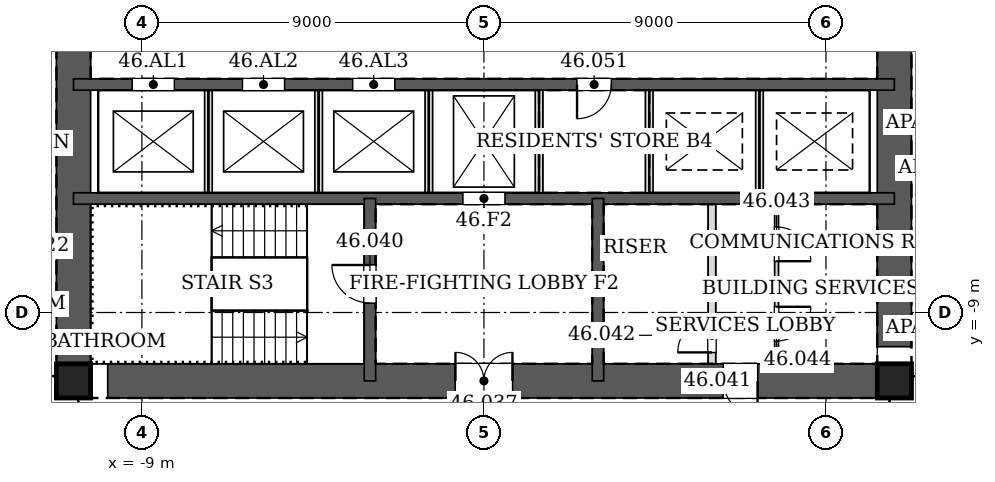
"""IFC4 building model, lengths in metres.
Left out: names, types, materials, properties, quantities, classifications, styles, units other than length and angle.
Written with IfcOpenShell. Run it as: python <this file> out.ifc"""

import sys

from ifc_helpers import new_model, si_unit, direction, frame, frame_2d, origin, origin_2d, place, context, subcontext, project, spatial, rectangle, hollow_rectangle, extrude, element, fill, save


model = new_model("IFC4")
c1 = context("Model", 3, precision=1e-05, world=origin(), true_north=direction((0.0, 1.0)))
c2 = subcontext(c1, "Body", "Model", "MODEL_VIEW")
j1 = project(units=[si_unit("LENGTHUNIT", "METRE"), si_unit("PLANEANGLEUNIT", "RADIAN")], contexts=[c1])
p1 = place(None, origin())
s1 = spatial("IfcSite", under=j1, at=p1, CompositionType="ELEMENT")
p2 = place(p1, origin())
s2 = spatial("IfcBuilding", under=s1, at=p2, CompositionType="ELEMENT")
p3 = place(p2, frame((0.0, 0.0, 204.0)))
s3 = spatial("IfcBuildingStorey", under=s2, at=p3, CompositionType="ELEMENT", Elevation=204.0)
for number, where, z_axis, x_axis in (
    (1, (-10.8, -10.8, 0.0), (0.0, 0.0, 1.0), (1.0, 0.0, 0.0)),
    (2, (10.8, -10.8, 0.0), (0.0, 0.0, 1.0), (1.0, 0.0, 0.0)),
):
    element("IfcColumn", number, at=place(p3, frame(where, z_axis=z_axis, x_axis=x_axis)), inside=s3, PredefinedType="COLUMN", context=c2, shape_type="SweptSolid", body=[
        extrude(hollow_rectangle(XDim=0.9, YDim=0.9, WallThickness=0.05, at=origin_2d()), origin(), (0.0, 0.0, 1.0), 3.4),
    ])
p4 = place(p3, frame((-10.8, -10.8, 0.0), z_axis=(0.0, 0.0, 1.0), x_axis=(1.0, 0.0, 0.0)))
e3 = element("IfcWall", 3, at=p4, inside=s3, PredefinedType="SOLIDWALL", context=c2, shape_type="SweptSolid", body=[
    extrude(rectangle(XDim=21.6, YDim=0.9, at=frame_2d((10.8, 0.0))), origin(), (0.0, 0.0, 1.0), 3.4),
])
p5 = place(p4, frame((10.05, 0.0, 0.0)))
e4 = element("IfcOpeningElement", 4, at=p5, cuts=e3, PredefinedType="OPENING", context=c2, shape_type="SweptSolid", body=[
    extrude(rectangle(XDim=1.5, YDim=2.1, at=frame_2d((0.75, 1.05))), frame((0.0, 0.46, 0.0), z_axis=(0.0, -1.0, 0.0), x_axis=(1.0, 0.0, 0.0)), (0.0, 0.0, 1.0), 0.92),
])
p6 = place(p4, frame((17.1, 0.0, 0.0)))
e5 = element("IfcOpeningElement", 5, at=p6, cuts=e3, PredefinedType="OPENING", context=c2, shape_type="SweptSolid", body=[
    extrude(rectangle(XDim=0.9, YDim=2.1, at=frame_2d((0.45, 1.05))), frame((0.0, 0.46, 0.0), z_axis=(0.0, -1.0, 0.0), x_axis=(1.0, 0.0, 0.0)), (0.0, 0.0, 1.0), 0.92),
])
p7 = place(p3, frame((10.8, -10.8, 0.0), z_axis=(0.0, 0.0, 1.0), x_axis=(0.0, 1.0, 0.0)))
e6 = element("IfcWall", 6, at=p7, inside=s3, PredefinedType="SOLIDWALL", context=c2, shape_type="SweptSolid", body=[
    extrude(rectangle(XDim=21.6, YDim=0.9, at=frame_2d((10.8, 0.0))), origin(), (0.0, 0.0, 1.0), 3.4),
])
p8 = place(p7, frame((11.7, 0.0, 0.0)))
e7 = element("IfcOpeningElement", 7, at=p8, cuts=e6, PredefinedType="OPENING", context=c2, shape_type="SweptSolid", body=[
    extrude(rectangle(XDim=1.2, YDim=2.1, at=frame_2d((0.6, 1.05))), frame((0.0, 0.46, 0.0), z_axis=(0.0, -1.0, 0.0), x_axis=(1.0, 0.0, 0.0)), (0.0, 0.0, 1.0), 0.92),
])
p9 = place(p7, frame((8.7, 0.0, 0.0)))
e8 = element("IfcOpeningElement", 8, at=p9, cuts=e6, PredefinedType="OPENING", context=c2, shape_type="SweptSolid", body=[
    extrude(rectangle(XDim=1.2, YDim=2.1, at=frame_2d((0.6, 1.05))), frame((0.0, 0.46, 0.0), z_axis=(0.0, -1.0, 0.0), x_axis=(1.0, 0.0, 0.0)), (0.0, 0.0, 1.0), 0.92),
])
p10 = place(p3, frame((-10.8, 10.8, 0.0), z_axis=(0.0, 0.0, 1.0), x_axis=(0.0, -1.0, 0.0)))
e9 = element("IfcWall", 9, at=p10, inside=s3, PredefinedType="SOLIDWALL", context=c2, shape_type="SweptSolid", body=[
    extrude(rectangle(XDim=21.6, YDim=0.9, at=frame_2d((10.8, 0.0))), origin(), (0.0, 0.0, 1.0), 3.4),
])
p11 = place(p10, frame((8.7, 0.0, 0.0)))
e10 = element("IfcOpeningElement", 10, at=p11, cuts=e9, PredefinedType="OPENING", context=c2, shape_type="SweptSolid", body=[
    extrude(rectangle(XDim=1.2, YDim=2.1, at=frame_2d((0.6, 1.05))), frame((0.0, 0.46, 0.0), z_axis=(0.0, -1.0, 0.0), x_axis=(1.0, 0.0, 0.0)), (0.0, 0.0, 1.0), 0.92),
])
p12 = place(p10, frame((11.7, 0.0, 0.0)))
e11 = element("IfcOpeningElement", 11, at=p12, cuts=e9, PredefinedType="OPENING", context=c2, shape_type="SweptSolid", body=[
    extrude(rectangle(XDim=1.2, YDim=2.1, at=frame_2d((0.6, 1.05))), frame((0.0, 0.46, 0.0), z_axis=(0.0, -1.0, 0.0), x_axis=(1.0, 0.0, 0.0)), (0.0, 0.0, 1.0), 0.92),
])
p13 = place(p3, frame((-10.8, -3.0, 0.0), z_axis=(0.0, 0.0, 1.0), x_axis=(1.0, 0.0, 0.0)))
e12 = element("IfcWall", 12, at=p13, inside=s3, PredefinedType="SOLIDWALL", context=c2, shape_type="SweptSolid", body=[
    extrude(rectangle(XDim=21.6, YDim=0.3, at=frame_2d((10.8, 0.0))), origin(), (0.0, 0.0, 1.0), 3.4),
])
p14 = place(p13, frame((13.25, 0.0, 0.0)))
e13 = element("IfcOpeningElement", 13, at=p14, cuts=e12, PredefinedType="OPENING", context=c2, shape_type="SweptSolid", body=[
    extrude(rectangle(XDim=0.9, YDim=2.1, at=frame_2d((0.45, 1.05))), frame((0.0, 0.16, 0.0), z_axis=(0.0, -1.0, 0.0), x_axis=(1.0, 0.0, 0.0)), (0.0, 0.0, 1.0), 0.32),
])
p15 = place(p13, frame((1.55, 0.0, 0.0)))
e14 = element("IfcOpeningElement", 14, at=p15, cuts=e12, PredefinedType="OPENING", context=c2, shape_type="SweptSolid", body=[
    extrude(rectangle(XDim=1.1, YDim=2.1, at=frame_2d((0.55, 1.05))), frame((0.0, 0.16, 0.0), z_axis=(0.0, -1.0, 0.0), x_axis=(1.0, 0.0, 0.0)), (0.0, 0.0, 1.0), 0.32),
])
p16 = place(p13, frame((4.45, 0.0, 0.0)))
e15 = element("IfcOpeningElement", 15, at=p16, cuts=e12, PredefinedType="OPENING", context=c2, shape_type="SweptSolid", body=[
    extrude(rectangle(XDim=1.1, YDim=2.1, at=frame_2d((0.55, 1.05))), frame((0.0, 0.16, 0.0), z_axis=(0.0, -1.0, 0.0), x_axis=(1.0, 0.0, 0.0)), (0.0, 0.0, 1.0), 0.32),
])
p17 = place(p13, frame((7.35, 0.0, 0.0)))
e16 = element("IfcOpeningElement", 16, at=p17, cuts=e12, PredefinedType="OPENING", context=c2, shape_type="SweptSolid", body=[
    extrude(rectangle(XDim=1.1, YDim=2.1, at=frame_2d((0.55, 1.05))), frame((0.0, 0.16, 0.0), z_axis=(0.0, -1.0, 0.0), x_axis=(1.0, 0.0, 0.0)), (0.0, 0.0, 1.0), 0.32),
])
p18 = place(p3, frame((-10.8, -6.0, 0.0), z_axis=(0.0, 0.0, 1.0), x_axis=(1.0, 0.0, 0.0)))
e17 = element("IfcWall", 17, at=p18, inside=s3, PredefinedType="SOLIDWALL", context=c2, shape_type="SweptSolid", body=[
    extrude(rectangle(XDim=21.6, YDim=0.3, at=frame_2d((10.8, 0.0))), origin(), (0.0, 0.0, 1.0), 3.4),
])
p19 = place(p18, frame((10.25, 0.0, 0.0)))
e18 = element("IfcOpeningElement", 18, at=p19, cuts=e17, PredefinedType="OPENING", context=c2, shape_type="SweptSolid", body=[
    extrude(rectangle(XDim=1.1, YDim=2.1, at=frame_2d((0.55, 1.05))), frame((0.0, 0.16, 0.0), z_axis=(0.0, -1.0, 0.0), x_axis=(1.0, 0.0, 0.0)), (0.0, 0.0, 1.0), 0.32),
])
p20 = place(p3, frame((-3.0, -6.0, 0.0), z_axis=(0.0, 0.0, 1.0), x_axis=(0.0, -1.0, 0.0)))
e19 = element("IfcWall", 19, at=p20, inside=s3, PredefinedType="SOLIDWALL", context=c2, shape_type="SweptSolid", body=[
    extrude(rectangle(XDim=4.8, YDim=0.3, at=frame_2d((2.4, 0.0))), origin(), (0.0, 0.0, 1.0), 3.4),
])
p21 = place(p20, frame((1.75, 0.0, 0.0)))
e20 = element("IfcOpeningElement", 20, at=p21, cuts=e19, PredefinedType="OPENING", context=c2, shape_type="SweptSolid", body=[
    extrude(rectangle(XDim=1.0, YDim=2.1, at=frame_2d((0.5, 1.05))), frame((0.0, 0.16, 0.0), z_axis=(0.0, -1.0, 0.0), x_axis=(1.0, 0.0, 0.0)), (0.0, 0.0, 1.0), 0.32),
])
p22 = place(p3, frame((3.0, -6.0, 0.0), z_axis=(0.0, 0.0, 1.0), x_axis=(0.0, -1.0, 0.0)))
e21 = element("IfcWall", 21, at=p22, inside=s3, PredefinedType="SOLIDWALL", context=c2, shape_type="SweptSolid", body=[
    extrude(rectangle(XDim=4.8, YDim=0.3, at=frame_2d((2.4, 0.0))), origin(), (0.0, 0.0, 1.0), 3.4),
])
for number, where, z_axis, x_axis in (
    (22, (-7.25, -5.85, 0.0), (0.0, 0.0, 1.0), (0.0, 1.0, 0.0)),
    (23, (-4.35, -5.85, 0.0), (0.0, 0.0, 1.0), (0.0, 1.0, 0.0)),
    (24, (-1.45, -5.85, 0.0), (0.0, 0.0, 1.0), (0.0, 1.0, 0.0)),
):
    element("IfcWall", number, at=place(p3, frame(where, z_axis=z_axis, x_axis=x_axis)), inside=s3, PredefinedType="PARTITIONING", context=c2, shape_type="SweptSolid", body=[
        extrude(rectangle(XDim=2.7, YDim=0.2, at=frame_2d((1.35, 0.0))), origin(), (0.0, 0.0, 1.0), 3.4),
    ])
for number, where, z_axis, x_axis in (
    (25, (1.45, -5.85, 0.0), (0.0, 0.0, 1.0), (0.0, 1.0, 0.0)),
    (26, (4.35, -5.85, 0.0), (0.0, 0.0, 1.0), (0.0, 1.0, 0.0)),
):
    element("IfcWall", number, at=place(p3, frame(where, z_axis=z_axis, x_axis=x_axis)), inside=s3, PredefinedType="PARTITIONING", context=c2, shape_type="SweptSolid", body=[
        extrude(rectangle(XDim=2.7, YDim=0.2, at=frame_2d((1.35, 0.0))), origin(), (0.0, 0.0, 1.0), 3.2),
    ])
p23 = place(p3, frame((7.25, -5.85, 0.0), z_axis=(0.0, 0.0, 1.0), x_axis=(0.0, 1.0, 0.0)))
e27 = element("IfcWall", 27, at=p23, inside=s3, PredefinedType="PARTITIONING", context=c2, shape_type="SweptSolid", body=[
    extrude(rectangle(XDim=2.7, YDim=0.2, at=frame_2d((1.35, 0.0))), origin(), (0.0, 0.0, 1.0), 3.4),
])
p24 = place(p3, frame((6.0, -10.35, 0.0), z_axis=(0.0, 0.0, 1.0), x_axis=(0.0, 1.0, 0.0)))
e28 = element("IfcWall", 28, at=p24, inside=s3, PredefinedType="PARTITIONING", context=c2, shape_type="SweptSolid", body=[
    extrude(rectangle(XDim=4.2, YDim=0.2, at=frame_2d((2.1, 0.0))), origin(), (0.0, 0.0, 1.0), 3.2),
])
p25 = place(p24, frame((0.3, 0.0, 0.0)))
e29 = element("IfcOpeningElement", 29, at=p25, cuts=e28, PredefinedType="OPENING", context=c2, shape_type="SweptSolid", body=[
    extrude(rectangle(XDim=0.9, YDim=2.1, at=frame_2d((0.45, 1.05))), frame((0.0, 0.11, 0.0), z_axis=(0.0, -1.0, 0.0), x_axis=(1.0, 0.0, 0.0)), (0.0, 0.0, 1.0), 0.22),
])
p26 = place(p3, frame((7.7, -10.35, 0.0), z_axis=(0.0, 0.0, 1.0), x_axis=(0.0, 1.0, 0.0)))
e30 = element("IfcWall", 30, at=p26, inside=s3, PredefinedType="PARTITIONING", context=c2, shape_type="SweptSolid", body=[
    extrude(rectangle(XDim=4.2, YDim=0.1, at=frame_2d((2.1, 0.0))), origin(), (0.0, 0.0, 1.0), 3.2),
])
p27 = place(p26, frame((2.7, 0.0, 0.0)))
e31 = element("IfcOpeningElement", 31, at=p27, cuts=e30, PredefinedType="OPENING", context=c2, shape_type="SweptSolid", body=[
    extrude(rectangle(XDim=0.9, YDim=2.1, at=frame_2d((0.45, 1.05))), frame((0.0, 0.06, 0.0), z_axis=(0.0, -1.0, 0.0), x_axis=(1.0, 0.0, 0.0)), (0.0, 0.0, 1.0), 0.12),
])
p28 = place(p26, frame((0.6, 0.0, 0.0)))
e32 = element("IfcOpeningElement", 32, at=p28, cuts=e30, PredefinedType="OPENING", context=c2, shape_type="SweptSolid", body=[
    extrude(rectangle(XDim=0.9, YDim=2.1, at=frame_2d((0.45, 1.05))), frame((0.0, 0.06, 0.0), z_axis=(0.0, -1.0, 0.0), x_axis=(1.0, 0.0, 0.0)), (0.0, 0.0, 1.0), 0.12),
])
p29 = place(p3, frame((7.7, -8.25, 0.0), z_axis=(0.0, 0.0, 1.0), x_axis=(1.0, 0.0, 0.0)))
e33 = element("IfcWall", 33, at=p29, inside=s3, PredefinedType="PARTITIONING", context=c2, shape_type="SweptSolid", body=[
    extrude(rectangle(XDim=2.65, YDim=0.1, at=frame_2d((1.325, 0.0))), origin(), (0.0, 0.0, 1.0), 3.2),
])
p30 = place(p5, origin())
e34 = element("IfcDoor", 34, at=p30, inside=s3, OperationType="DOUBLE_DOOR_SINGLE_SWING", PredefinedType="DOOR", context=c2, shape_type="SweptSolid", body=[
    extrude(rectangle(XDim=1.5, YDim=2.1, at=frame_2d((0.75, 1.05))), frame((0.0, 0.025, 0.0), z_axis=(0.0, -1.0, 0.0), x_axis=(1.0, 0.0, 0.0)), (0.0, 0.0, 1.0), 0.05),
])
fill(e4, e34)
p31 = place(p21, frame((1.0, 0.0, 0.0), z_axis=(0.0, 0.0, 1.0), x_axis=(-1.0, 0.0, 0.0)))
e35 = element("IfcDoor", 35, at=p31, inside=s3, OperationType="SINGLE_SWING_RIGHT", PredefinedType="DOOR", context=c2, shape_type="SweptSolid", body=[
    extrude(rectangle(XDim=1.0, YDim=2.1, at=frame_2d((0.5, 1.05))), frame((0.0, 0.025, 0.0), z_axis=(0.0, -1.0, 0.0), x_axis=(1.0, 0.0, 0.0)), (0.0, 0.0, 1.0), 0.05),
])
fill(e20, e35)
p32 = place(p6, frame((0.9, 0.0, 0.0), z_axis=(0.0, 0.0, 1.0), x_axis=(-1.0, 0.0, 0.0)))
e36 = element("IfcDoor", 36, at=p32, inside=s3, OperationType="SINGLE_SWING_LEFT", PredefinedType="DOOR", context=c2, shape_type="SweptSolid", body=[
    extrude(rectangle(XDim=0.9, YDim=2.1, at=frame_2d((0.45, 1.05))), frame((0.0, 0.025, 0.0), z_axis=(0.0, -1.0, 0.0), x_axis=(1.0, 0.0, 0.0)), (0.0, 0.0, 1.0), 0.05),
])
fill(e5, e36)
p33 = place(p25, origin())
e37 = element("IfcDoor", 37, at=p33, inside=s3, OperationType="SINGLE_SWING_LEFT", PredefinedType="DOOR", context=c2, shape_type="SweptSolid", body=[
    extrude(rectangle(XDim=0.9, YDim=2.1, at=frame_2d((0.45, 1.05))), frame((0.0, 0.025, 0.0), z_axis=(0.0, -1.0, 0.0), x_axis=(1.0, 0.0, 0.0)), (0.0, 0.0, 1.0), 0.05),
])
fill(e29, e37)
p34 = place(p27, frame((0.9, 0.0, 0.0), z_axis=(0.0, 0.0, 1.0), x_axis=(-1.0, 0.0, 0.0)))
e38 = element("IfcDoor", 38, at=p34, inside=s3, OperationType="SINGLE_SWING_RIGHT", PredefinedType="DOOR", context=c2, shape_type="SweptSolid", body=[
    extrude(rectangle(XDim=0.9, YDim=2.1, at=frame_2d((0.45, 1.05))), frame((0.0, 0.025, 0.0), z_axis=(0.0, -1.0, 0.0), x_axis=(1.0, 0.0, 0.0)), (0.0, 0.0, 1.0), 0.05),
])
fill(e31, e38)
p35 = place(p28, frame((0.9, 0.0, 0.0), z_axis=(0.0, 0.0, 1.0), x_axis=(-1.0, 0.0, 0.0)))
e39 = element("IfcDoor", 39, at=p35, inside=s3, OperationType="SINGLE_SWING_LEFT", PredefinedType="DOOR", context=c2, shape_type="SweptSolid", body=[
    extrude(rectangle(XDim=0.9, YDim=2.1, at=frame_2d((0.45, 1.05))), frame((0.0, 0.025, 0.0), z_axis=(0.0, -1.0, 0.0), x_axis=(1.0, 0.0, 0.0)), (0.0, 0.0, 1.0), 0.05),
])
fill(e32, e39)
p36 = place(p14, frame((0.9, 0.0, 0.0), z_axis=(0.0, 0.0, 1.0), x_axis=(-1.0, 0.0, 0.0)))
e40 = element("IfcDoor", 40, at=p36, inside=s3, OperationType="SINGLE_SWING_RIGHT", PredefinedType="DOOR", context=c2, shape_type="SweptSolid", body=[
    extrude(rectangle(XDim=0.9, YDim=2.1, at=frame_2d((0.45, 1.05))), frame((0.0, 0.025, 0.0), z_axis=(0.0, -1.0, 0.0), x_axis=(1.0, 0.0, 0.0)), (0.0, 0.0, 1.0), 0.05),
])
fill(e13, e40)
p37 = place(p19, origin())
e41 = element("IfcDoor", 41, at=p37, inside=s3, OperationType="DOUBLE_DOOR_SLIDING", PredefinedType="DOOR", context=c2, shape_type="SweptSolid", body=[
    extrude(rectangle(XDim=1.1, YDim=2.1, at=frame_2d((0.55, 1.05))), frame((0.0, 0.025, 0.0), z_axis=(0.0, -1.0, 0.0), x_axis=(1.0, 0.0, 0.0)), (0.0, 0.0, 1.0), 0.05),
])
fill(e18, e41)
p38 = place(p15, origin())
e42 = element("IfcDoor", 42, at=p38, inside=s3, OperationType="DOUBLE_DOOR_SLIDING", PredefinedType="DOOR", context=c2, shape_type="SweptSolid", body=[
    extrude(rectangle(XDim=1.1, YDim=2.1, at=frame_2d((0.55, 1.05))), frame((0.0, 0.025, 0.0), z_axis=(0.0, -1.0, 0.0), x_axis=(1.0, 0.0, 0.0)), (0.0, 0.0, 1.0), 0.05),
])
fill(e14, e42)
p39 = place(p16, origin())
e43 = element("IfcDoor", 43, at=p39, inside=s3, OperationType="DOUBLE_DOOR_SLIDING", PredefinedType="DOOR", context=c2, shape_type="SweptSolid", body=[
    extrude(rectangle(XDim=1.1, YDim=2.1, at=frame_2d((0.55, 1.05))), frame((0.0, 0.025, 0.0), z_axis=(0.0, -1.0, 0.0), x_axis=(1.0, 0.0, 0.0)), (0.0, 0.0, 1.0), 0.05),
])
fill(e15, e43)
p40 = place(p17, origin())
e44 = element("IfcDoor", 44, at=p40, inside=s3, OperationType="DOUBLE_DOOR_SLIDING", PredefinedType="DOOR", context=c2, shape_type="SweptSolid", body=[
    extrude(rectangle(XDim=1.1, YDim=2.1, at=frame_2d((0.55, 1.05))), frame((0.0, 0.025, 0.0), z_axis=(0.0, -1.0, 0.0), x_axis=(1.0, 0.0, 0.0)), (0.0, 0.0, 1.0), 0.05),
])
fill(e16, e44)
save(model, sys.argv[1])
